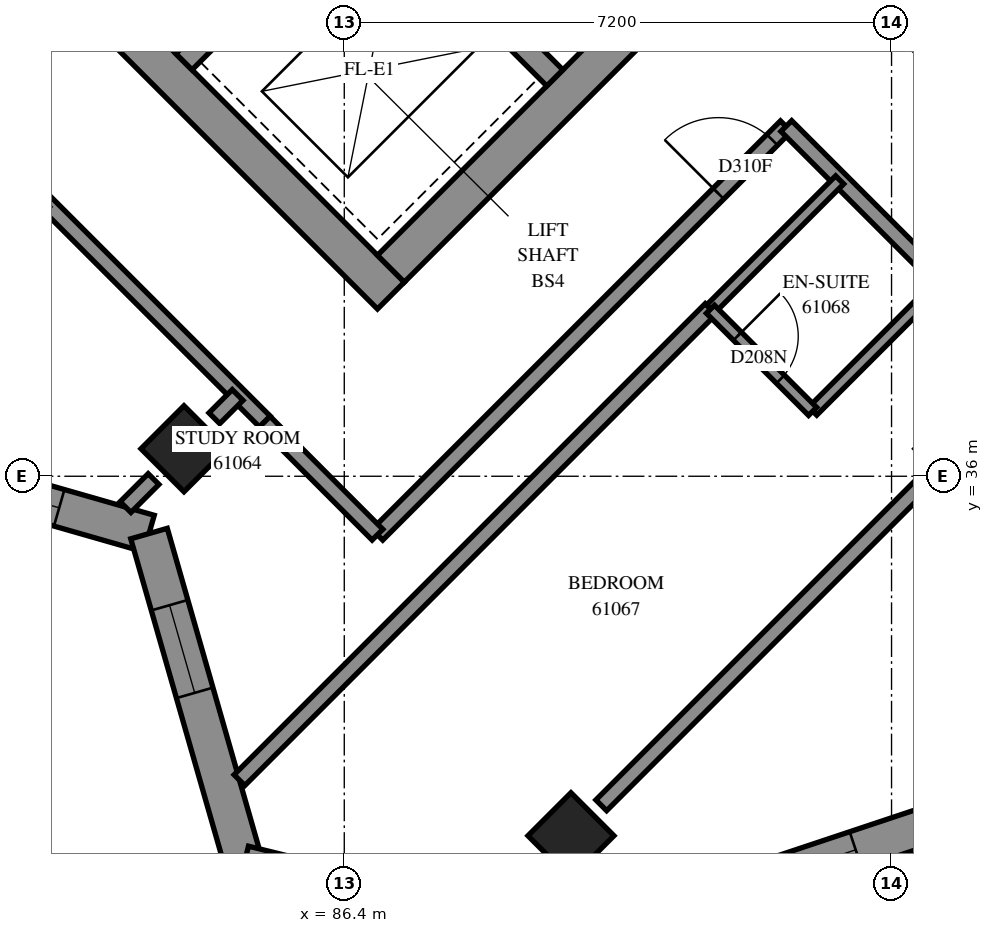
"""IFC4 building model, lengths in metres.
Left out: names, types, materials, properties, quantities, classifications, styles, units other than length and angle.
Written with IfcOpenShell. Run it as: python <this file> out.ifc"""

import sys

from ifc_helpers import new_model, si_unit, direction, frame, frame_2d, origin, origin_2d, place, context, subcontext, project, spatial, polyline, rectangle, outline, extrude, element, fill, save


model = new_model("IFC4")
c1 = context("Model", 3, precision=1e-05, world=origin(), true_north=direction((0.0, 1.0)))
c2 = subcontext(c1, "Body", "Model", "MODEL_VIEW")
j1 = project(units=[si_unit("LENGTHUNIT", "METRE"), si_unit("PLANEANGLEUNIT", "RADIAN")], contexts=[c1])
p1 = place(None, origin())
s1 = spatial("IfcSite", under=j1, at=p1, CompositionType="ELEMENT")
p2 = place(p1, origin())
s2 = spatial("IfcBuilding", under=s1, at=p2, CompositionType="ELEMENT")
p3 = place(p2, frame((0.0, 0.0, 223.6)))
s3 = spatial("IfcBuildingStorey", under=s2, at=p3, CompositionType="ELEMENT", Elevation=223.6)
for number, where, z_axis, x_axis in (
    (1, (84.291, 36.362, 0.0), (0.0, 0.0, 1.0), (0.707, -0.707, 0.0)),
    (2, (89.382, 31.271, 0.0), (0.0, 0.0, 1.0), (0.707, -0.707, 0.0)),
):
    element("IfcColumn", number, at=place(p3, frame(where, z_axis=z_axis, x_axis=x_axis)), inside=s3, PredefinedType="COLUMN", context=c2, shape_type="SweptSolid", body=[
        extrude(rectangle(XDim=0.8, YDim=0.8, at=origin_2d()), origin(), (0.0, 0.0, 1.0), 3.1),
    ])
p4 = place(p3, frame((76.124, 49.267, -0.3), z_axis=(0.0, 0.0, 1.0), x_axis=(0.7071067812, -0.7071067812, 0.0)))
e3 = element("IfcWall", 3, at=p4, inside=s3, PredefinedType="SHEAR", context=c2, shape_type="SweptSolid", body=[
    extrude(rectangle(XDim=15.4, YDim=0.5, at=frame_2d((7.7, 0.0))), origin(), (0.0, 0.0, 1.0), 2.7),
])
p5 = place(p3, frame((87.013, 38.731, -0.3), z_axis=(0.0, 0.0, 1.0), x_axis=(0.7071067812, 0.7071067812, 0.0)))
e4 = element("IfcWall", 4, at=p5, inside=s3, PredefinedType="SHEAR", context=c2, shape_type="SweptSolid", body=[
    extrude(rectangle(XDim=14.4, YDim=0.5, at=frame_2d((7.2, 0.0))), origin(), (0.0, 0.0, 1.0), 2.7),
])
p6 = place(p5, frame((4.55, 0.0, 0.3)))
e5 = element("IfcOpeningElement", 5, at=p6, cuts=e4, PredefinedType="OPENING", context=c2, shape_type="SweptSolid", body=[
    extrude(rectangle(XDim=1.1, YDim=2.1, at=frame_2d((0.55, 1.05))), frame((0.0, 0.26, 0.0), z_axis=(0.0, -1.0, 0.0), x_axis=(1.0, 0.0, 0.0)), (0.0, 0.0, 1.0), 0.52),
])
p7 = place(p5, frame((11.35, 0.0, 0.3)))
e6 = element("IfcOpeningElement", 6, at=p7, cuts=e4, PredefinedType="OPENING", context=c2, shape_type="SweptSolid", body=[
    extrude(rectangle(XDim=1.1, YDim=2.1, at=frame_2d((0.55, 1.05))), frame((0.0, 0.26, 0.0), z_axis=(0.0, -1.0, 0.0), x_axis=(1.0, 0.0, 0.0)), (0.0, 0.0, 1.0), 0.52),
])
p8 = place(p3, frame((84.291, 41.453, 0.0), z_axis=(0.0, 0.0, 1.0), x_axis=(0.7071067812, 0.7071067812, 0.0)))
e7 = element("IfcWall", 7, at=p8, inside=s3, PredefinedType="SOLIDWALL", context=c2, shape_type="SweptSolid", body=[
    extrude(rectangle(XDim=3.3, YDim=0.3, at=frame_2d((1.65, 0.0))), origin(), (0.0, 0.0, 1.0), 3.1),
])
p9 = place(p3, frame((78.988, 51.423, 0.0), z_axis=(0.0, 0.0, 1.0), x_axis=(0.7071067812, -0.7071067812, 0.0)))
e8 = element("IfcWall", 8, at=p9, inside=s3, PredefinedType="SOLIDWALL", context=c2, shape_type="SweptSolid", body=[
    extrude(rectangle(XDim=14.4, YDim=0.3, at=frame_2d((7.2, 0.0))), origin(), (0.0, 0.0, 1.0), 3.1),
])
p10 = place(p9, frame((1.35, 0.0, 0.0)))
e9 = element("IfcOpeningElement", 9, at=p10, cuts=e8, PredefinedType="OPENING", context=c2, shape_type="SweptSolid", body=[
    extrude(rectangle(XDim=0.9, YDim=2.1, at=frame_2d((0.45, 1.05))), frame((0.0, 0.16, 0.0), z_axis=(0.0, -1.0, 0.0), x_axis=(1.0, 0.0, 0.0)), (0.0, 0.0, 1.0), 0.32),
])
p11 = place(p9, frame((4.95, 0.0, 0.0)))
e10 = element("IfcOpeningElement", 10, at=p11, cuts=e8, PredefinedType="OPENING", context=c2, shape_type="SweptSolid", body=[
    extrude(rectangle(XDim=0.9, YDim=2.1, at=frame_2d((0.45, 1.05))), frame((0.0, 0.16, 0.0), z_axis=(0.0, -1.0, 0.0), x_axis=(1.0, 0.0, 0.0)), (0.0, 0.0, 1.0), 0.32),
])
p12 = place(p9, frame((8.55, 0.0, 0.0)))
e11 = element("IfcOpeningElement", 11, at=p12, cuts=e8, PredefinedType="OPENING", context=c2, shape_type="SweptSolid", body=[
    extrude(rectangle(XDim=0.9, YDim=2.1, at=frame_2d((0.45, 1.05))), frame((0.0, 0.16, 0.0), z_axis=(0.0, -1.0, 0.0), x_axis=(1.0, 0.0, 0.0)), (0.0, 0.0, 1.0), 0.32),
])
p13 = place(p9, frame((12.05, 0.0, 0.0)))
e12 = element("IfcOpeningElement", 12, at=p13, cuts=e8, PredefinedType="OPENING", context=c2, shape_type="SweptSolid", body=[
    extrude(rectangle(XDim=1.1, YDim=2.1, at=frame_2d((0.55, 1.05))), frame((0.0, 0.16, 0.0), z_axis=(0.0, -1.0, 0.0), x_axis=(1.0, 0.0, 0.0)), (0.0, 0.0, 1.0), 0.32),
])
p14 = place(p3, frame((89.372, 29.834, 0.0), z_axis=(0.0, 0.0, 1.0), x_axis=(0.9486832981, 0.316227766, 0.0)))
e13 = element("IfcWall", 13, at=p14, inside=s3, PredefinedType="SOLIDWALL", context=c2, shape_type="SweptSolid", body=[
    extrude(outline(polyline([(-0.072, -0.25), (5.294, -0.25), (5.055, 0.25), (0.072, 0.25), (-0.072, -0.25)])), origin(), (0.0, 0.0, 1.0), 3.1),
])
p15 = place(p14, frame((1.159, 0.0, 0.45)))
e14 = element("IfcOpeningElement", 14, at=p15, cuts=e13, PredefinedType="OPENING", context=c2, shape_type="SweptSolid", body=[
    extrude(rectangle(XDim=1.3, YDim=2.5, at=frame_2d((0.65, 1.25))), frame((0.0, 0.26, 0.0), z_axis=(0.0, -1.0, 0.0), x_axis=(1.0, 0.0, 0.0)), (0.0, 0.0, 1.0), 0.52),
])
p16 = place(p14, frame((2.659, 0.0, 0.45)))
e15 = element("IfcOpeningElement", 15, at=p16, cuts=e13, PredefinedType="OPENING", context=c2, shape_type="SweptSolid", body=[
    extrude(rectangle(XDim=1.3, YDim=2.5, at=frame_2d((0.65, 1.25))), frame((0.0, 0.26, 0.0), z_axis=(0.0, -1.0, 0.0), x_axis=(1.0, 0.0, 0.0)), (0.0, 0.0, 1.0), 0.52),
])
p17 = place(p3, frame((79.476, 36.495, 0.0), z_axis=(0.0, 0.0, 1.0), x_axis=(0.9612862254, -0.2755517971, 0.0)))
e16 = element("IfcWall", 16, at=p17, inside=s3, PredefinedType="SOLIDWALL", context=c2, shape_type="SweptSolid", body=[
    extrude(outline(polyline([(-0.145, -0.25), (4.392, -0.25), (4.67, 0.25), (0.145, 0.25), (-0.145, -0.25)])), origin(), (0.0, 0.0, 1.0), 3.1),
])
p18 = place(p17, frame((0.501, 0.0, 0.45)))
e17 = element("IfcOpeningElement", 17, at=p18, cuts=e16, PredefinedType="OPENING", context=c2, shape_type="SweptSolid", body=[
    extrude(rectangle(XDim=1.3, YDim=2.5, at=frame_2d((0.65, 1.25))), frame((0.0, 0.26, 0.0), z_axis=(0.0, -1.0, 0.0), x_axis=(1.0, 0.0, 0.0)), (0.0, 0.0, 1.0), 0.52),
])
p19 = place(p17, frame((2.002, 0.0, 0.45)))
e18 = element("IfcOpeningElement", 18, at=p19, cuts=e16, PredefinedType="OPENING", context=c2, shape_type="SweptSolid", body=[
    extrude(rectangle(XDim=1.3, YDim=2.5, at=frame_2d((0.65, 1.25))), frame((0.0, 0.26, 0.0), z_axis=(0.0, -1.0, 0.0), x_axis=(1.0, 0.0, 0.0)), (0.0, 0.0, 1.0), 0.52),
])
p20 = place(p3, frame((83.831, 35.246, 0.0), z_axis=(0.0, 0.0, 1.0), x_axis=(0.2755517971, -0.9612862254, 0.0)))
e19 = element("IfcWall", 19, at=p20, inside=s3, PredefinedType="SOLIDWALL", context=c2, shape_type="SweptSolid", body=[
    extrude(outline(polyline([(0.139, -0.25), (4.676, -0.25), (4.386, 0.25), (-0.139, 0.25), (0.139, -0.25)])), origin(), (0.0, 0.0, 1.0), 3.1),
])
p21 = place(p20, frame((0.98, 0.0, 0.45)))
e20 = element("IfcOpeningElement", 20, at=p21, cuts=e19, PredefinedType="OPENING", context=c2, shape_type="SweptSolid", body=[
    extrude(rectangle(XDim=1.2, YDim=2.5, at=frame_2d((0.6, 1.25))), frame((0.0, 0.26, 0.0), z_axis=(0.0, -1.0, 0.0), x_axis=(1.0, 0.0, 0.0)), (0.0, 0.0, 1.0), 0.52),
])
p22 = place(p3, frame((85.08, 30.89, 0.0), z_axis=(0.0, 0.0, 1.0), x_axis=(0.9709947618, -0.2391007581, 0.0)))
e21 = element("IfcWall", 21, at=p22, inside=s3, PredefinedType="SOLIDWALL", context=c2, shape_type="SweptSolid", body=[
    extrude(outline(polyline([(-0.145, -0.25), (4.493, -0.25), (4.348, 0.25), (0.145, 0.25), (-0.145, -0.25)])), origin(), (0.0, 0.0, 1.0), 3.1),
])
p23 = place(p22, frame((2.054, 0.0, 0.45)))
e22 = element("IfcOpeningElement", 22, at=p23, cuts=e21, PredefinedType="OPENING", context=c2, shape_type="SweptSolid", body=[
    extrude(rectangle(XDim=1.2, YDim=2.5, at=frame_2d((0.6, 1.25))), frame((0.0, 0.26, 0.0), z_axis=(0.0, -1.0, 0.0), x_axis=(1.0, 0.0, 0.0)), (0.0, 0.0, 1.0), 0.52),
])
p24 = place(p3, frame((85.021, 32.002, 0.0), z_axis=(0.0, 0.0, 1.0), x_axis=(0.7071010771, 0.7071124852, 0.0)))
e23 = element("IfcWall", 23, at=p24, inside=s3, PredefinedType="PARTITIONING", context=c2, shape_type="SweptSolid", body=[
    extrude(rectangle(XDim=8.766, YDim=0.2, at=frame_2d((4.383, 0.0))), origin(), (0.0, 0.0, 1.0), 3.1),
])
p25 = place(p3, frame((86.835, 35.231, 0.0), z_axis=(0.0, 0.0, 1.0), x_axis=(0.7071067812, 0.7071067812, 0.0)))
e24 = element("IfcWall", 24, at=p25, inside=s3, PredefinedType="PARTITIONING", context=c2, shape_type="SweptSolid", body=[
    extrude(rectangle(XDim=7.6, YDim=0.2, at=frame_2d((3.8, 0.0))), origin(), (0.0, 0.0, 1.0), 3.1),
])
p26 = place(p25, frame((6.346, 0.0, 0.0)))
e25 = element("IfcOpeningElement", 25, at=p26, cuts=e24, PredefinedType="OPENING", context=c2, shape_type="SweptSolid", body=[
    extrude(rectangle(XDim=1.0, YDim=2.1, at=frame_2d((0.5, 1.05))), frame((0.0, 0.11, 0.0), z_axis=(0.0, -1.0, 0.0), x_axis=(1.0, 0.0, 0.0)), (0.0, 0.0, 1.0), 0.22),
])
p27 = place(p3, frame((80.522, 41.553, 0.0), z_axis=(0.0, 0.0, 1.0), x_axis=(0.7071067812, -0.7071067812, 0.0)))
e26 = element("IfcWall", 26, at=p27, inside=s3, PredefinedType="PARTITIONING", context=c2, shape_type="SweptSolid", body=[
    extrude(rectangle(XDim=6.836, YDim=0.2, at=frame_2d((3.418, 0.0))), origin(), (0.0, 0.0, 1.0), 3.1),
])
p28 = place(p3, frame((89.781, 31.671, 0.0), z_axis=(0.0, 0.0, 1.0), x_axis=(0.7071067812, 0.7071067812, 0.0)))
e27 = element("IfcWall", 27, at=p28, inside=s3, PredefinedType="PARTITIONING", context=c2, shape_type="SweptSolid", body=[
    extrude(rectangle(XDim=6.07, YDim=0.2, at=frame_2d((3.035, 0.0))), origin(), (0.0, 0.0, 1.0), 2.6),
])
p29 = place(p3, frame((93.623, 42.015, 0.0), z_axis=(0.0, 0.0, 1.0), x_axis=(0.7071067812, -0.7071067812, 0.0)))
e28 = element("IfcWall", 28, at=p29, inside=s3, PredefinedType="PARTITIONING", context=c2, shape_type="SweptSolid", body=[
    extrude(rectangle(XDim=4.599, YDim=0.2, at=frame_2d((2.3, 0.0))), origin(), (0.0, 0.0, 1.0), 3.1),
])
p30 = place(p29, frame((1.349, 0.0, 0.0)))
e29 = element("IfcOpeningElement", 29, at=p30, cuts=e28, PredefinedType="OPENING", context=c2, shape_type="SweptSolid", body=[
    extrude(rectangle(XDim=0.9, YDim=2.1, at=frame_2d((0.45, 1.05))), frame((0.0, 0.11, 0.0), z_axis=(0.0, -1.0, 0.0), x_axis=(1.0, 0.0, 0.0)), (0.0, 0.0, 1.0), 0.22),
])
p31 = place(p3, frame((92.216, 40.608, 0.0), z_axis=(0.0, 0.0, 1.0), x_axis=(0.7071067812, -0.7071067812, 0.0)))
e30 = element("IfcWall", 30, at=p31, inside=s3, PredefinedType="PARTITIONING", context=c2, shape_type="SweptSolid", body=[
    extrude(rectangle(XDim=4.599, YDim=0.2, at=frame_2d((2.3, 0.0))), origin(), (0.0, 0.0, 1.0), 3.1),
])
p32 = place(p31, frame((3.189, 0.0, 0.0)))
e31 = element("IfcOpeningElement", 31, at=p32, cuts=e30, PredefinedType="OPENING", context=c2, shape_type="SweptSolid", body=[
    extrude(rectangle(XDim=0.9, YDim=2.1, at=frame_2d((0.45, 1.05))), frame((0.0, 0.11, 0.0), z_axis=(0.0, -1.0, 0.0), x_axis=(1.0, 0.0, 0.0)), (0.0, 0.0, 1.0), 0.22),
])
for number, where, z_axis, x_axis in (
    (32, (92.563, 36.857, 0.0), (0.0, 0.0, 1.0), (0.707, 0.707, 0.0)),
    (33, (91.219, 38.201, 0.0), (0.0, 0.0, 1.0), (0.707, 0.707, 0.0)),
):
    element("IfcWall", number, at=place(p3, frame(where, z_axis=z_axis, x_axis=x_axis)), inside=s3, PredefinedType="PARTITIONING", context=c2, shape_type="SweptSolid", body=[
        extrude(rectangle(XDim=2.401, YDim=0.15, at=frame_2d((1.201, 0.0))), origin(), (0.0, 0.0, 1.0), 3.1),
    ])
p33 = place(p3, frame((85.353, 36.717, 0.0), z_axis=(0.0, 0.0, 1.0), x_axis=(0.7066304548, -0.7075827869, 0.0)))
e34 = element("IfcWall", 34, at=p33, inside=s3, PredefinedType="PARTITIONING", context=c2, shape_type="SweptSolid", body=[
    extrude(rectangle(XDim=2.1, YDim=0.2, at=frame_2d((1.05, 0.0))), origin(), (0.0, 0.0, 1.0), 3.1),
])
p34 = place(p3, frame((91.217, 38.197, 0.0), z_axis=(0.0, 0.0, 1.0), x_axis=(0.7071067812, -0.7071067812, 0.0)))
e35 = element("IfcWall", 35, at=p34, inside=s3, PredefinedType="PARTITIONING", context=c2, shape_type="SweptSolid", body=[
    extrude(rectangle(XDim=1.901, YDim=0.15, at=frame_2d((0.95, 0.0))), origin(), (0.0, 0.0, 1.0), 3.1),
])
p35 = place(p34, frame((0.502, 0.0, 0.0)))
e36 = element("IfcOpeningElement", 36, at=p35, cuts=e35, PredefinedType="OPENING", context=c2, shape_type="SweptSolid", body=[
    extrude(rectangle(XDim=0.8, YDim=2.1, at=frame_2d((0.4, 1.05))), frame((0.0, 0.085, 0.0), z_axis=(0.0, -1.0, 0.0), x_axis=(1.0, 0.0, 0.0)), (0.0, 0.0, 1.0), 0.17),
])
p36 = place(p3, frame((83.522, 35.595, 0.0), z_axis=(0.0, 0.0, 1.0), x_axis=(0.7070108438, 0.7072027056, 0.0)))
e37 = element("IfcWall", 37, at=p36, inside=s3, PredefinedType="PARTITIONING", context=c2, shape_type="SweptSolid", body=[
    extrude(rectangle(XDim=0.521, YDim=0.2, at=frame_2d((0.261, 0.0))), origin(), (0.0, 0.0, 1.0), 3.1),
])
p37 = place(p3, frame((84.691, 36.763, 0.0), z_axis=(0.0, 0.0, 1.0), x_axis=(0.7071067812, 0.7071067812, 0.0)))
e38 = element("IfcWall", 38, at=p37, inside=s3, PredefinedType="PARTITIONING", context=c2, shape_type="SweptSolid", body=[
    extrude(rectangle(XDim=0.433, YDim=0.2, at=frame_2d((0.216, 0.0))), origin(), (0.0, 0.0, 1.0), 3.1),
])
p38 = place(p16, origin())
e39 = element("IfcWindow", 39, at=p38, inside=s3, PartitioningType="SINGLE_PANEL", PredefinedType="WINDOW", context=c2, shape_type="SweptSolid", body=[
    extrude(rectangle(XDim=1.3, YDim=2.5, at=frame_2d((0.65, 1.25))), frame((0.0, 0.18, 0.0), z_axis=(0.0, -1.0, 0.0), x_axis=(1.0, 0.0, 0.0)), (0.0, 0.0, 1.0), 0.06),
])
fill(e15, e39)
p39 = place(p19, origin())
e40 = element("IfcWindow", 40, at=p39, inside=s3, PartitioningType="SINGLE_PANEL", PredefinedType="WINDOW", context=c2, shape_type="SweptSolid", body=[
    extrude(rectangle(XDim=1.3, YDim=2.5, at=frame_2d((0.65, 1.25))), frame((0.0, 0.18, 0.0), z_axis=(0.0, -1.0, 0.0), x_axis=(1.0, 0.0, 0.0)), (0.0, 0.0, 1.0), 0.06),
])
fill(e18, e40)
p40 = place(p21, origin())
e41 = element("IfcWindow", 41, at=p40, inside=s3, PartitioningType="SINGLE_PANEL", PredefinedType="WINDOW", context=c2, shape_type="SweptSolid", body=[
    extrude(rectangle(XDim=1.2, YDim=2.5, at=frame_2d((0.6, 1.25))), frame((0.0, 0.18, 0.0), z_axis=(0.0, -1.0, 0.0), x_axis=(1.0, 0.0, 0.0)), (0.0, 0.0, 1.0), 0.06),
])
fill(e20, e41)
p41 = place(p26, origin())
e42 = element("IfcDoor", 42, at=p41, inside=s3, OperationType="SINGLE_SWING_RIGHT", PredefinedType="DOOR", context=c2, shape_type="SweptSolid", body=[
    extrude(rectangle(XDim=1.0, YDim=2.1, at=frame_2d((0.5, 1.05))), frame((0.0, 0.025, 0.0), z_axis=(0.0, -1.0, 0.0), x_axis=(1.0, 0.0, 0.0)), (0.0, 0.0, 1.0), 0.05),
])
fill(e25, e42)
p42 = place(p35, origin())
e43 = element("IfcDoor", 43, at=p42, inside=s3, OperationType="SINGLE_SWING_RIGHT", PredefinedType="DOOR", context=c2, shape_type="SweptSolid", body=[
    extrude(rectangle(XDim=0.8, YDim=2.1, at=frame_2d((0.4, 1.05))), frame((0.0, 0.025, 0.0), z_axis=(0.0, -1.0, 0.0), x_axis=(1.0, 0.0, 0.0)), (0.0, 0.0, 1.0), 0.05),
])
fill(e36, e43)
save(model, sys.argv[1])
